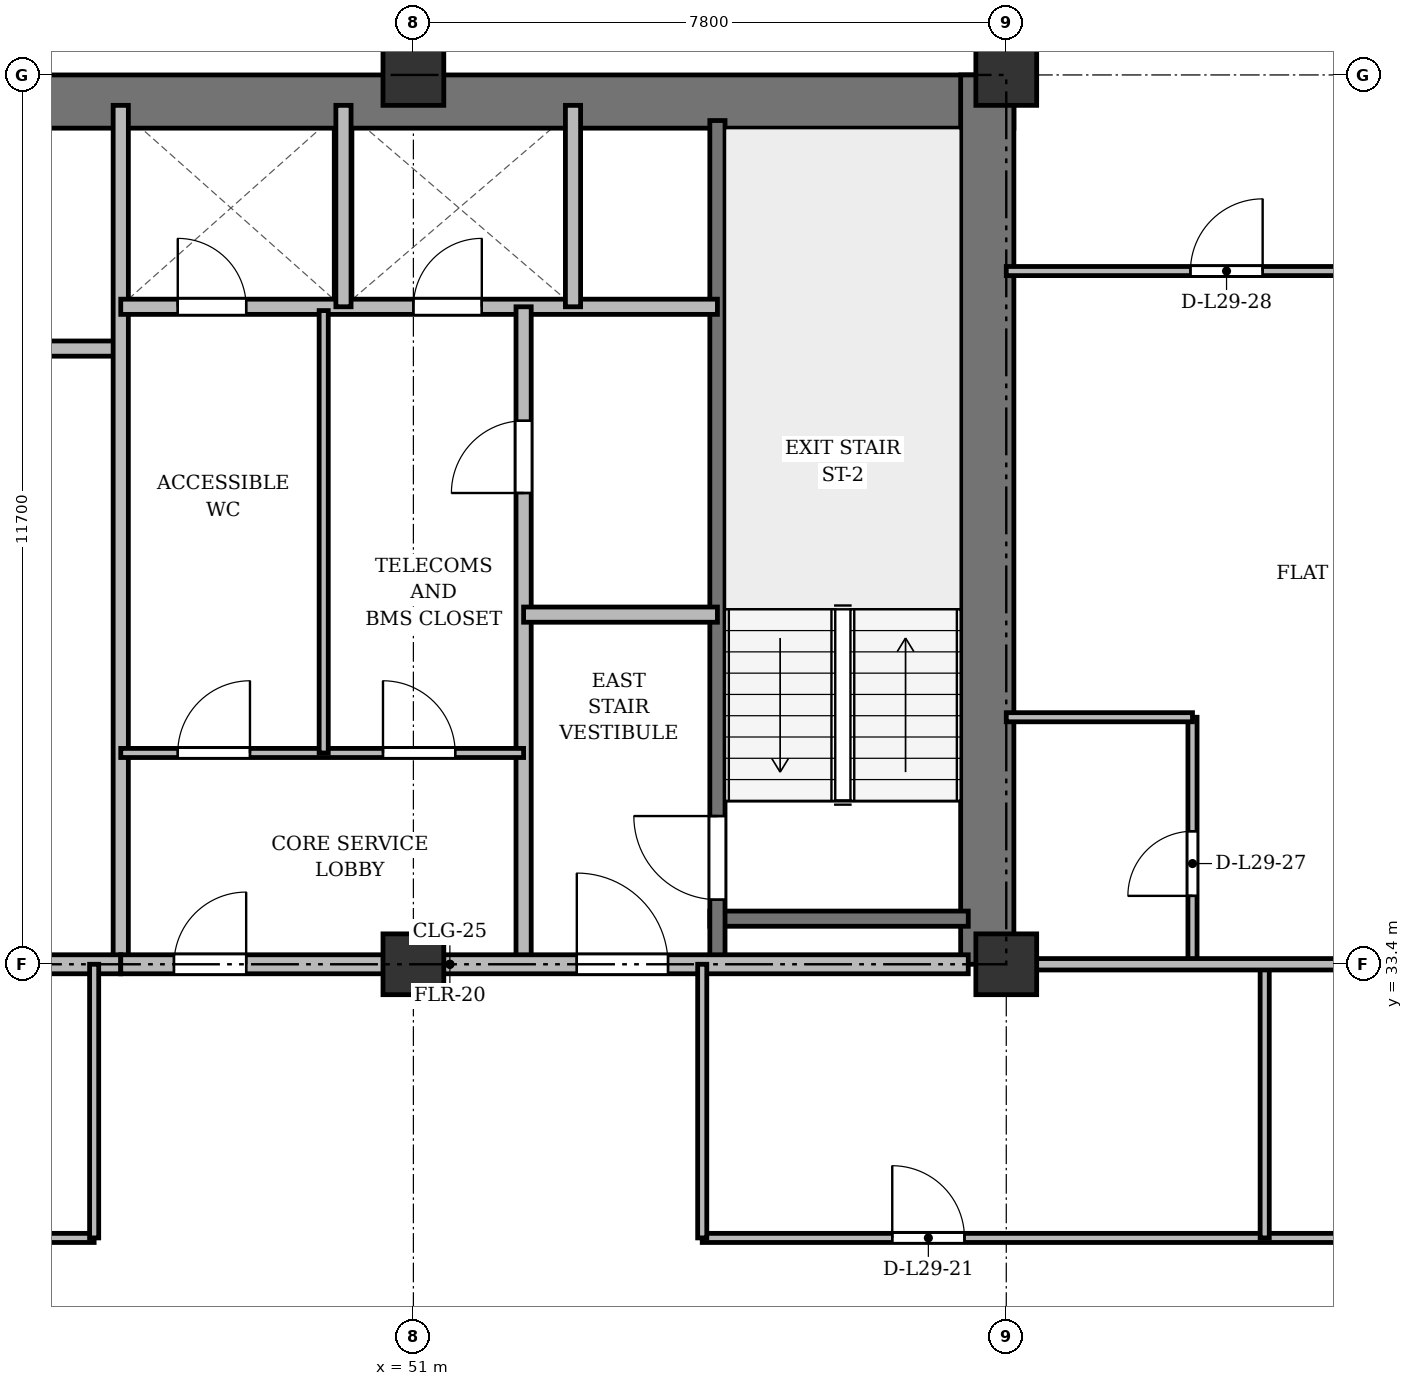
"""IFC4 building model, lengths in metres.
Left out: names, types, materials, properties, quantities, classifications, styles, units other than length and angle.
Written with IfcOpenShell. Run it as: python <this file> out.ifc"""

import sys

from ifc_helpers import new_model, si_unit, direction, frame, frame_2d, origin, origin_2d, place, context, subcontext, project, spatial, rectangle, extrude, source, transform, mapped, element, fill, save


model = new_model("IFC4")
c1 = context("Model", 3, precision=1e-05, world=origin(), true_north=direction((0.0, 1.0)))
c2 = subcontext(c1, "Body", "Model", "MODEL_VIEW")
j1 = project(units=[si_unit("LENGTHUNIT", "METRE"), si_unit("PLANEANGLEUNIT", "RADIAN")], contexts=[c1])
p1 = place(None, origin())
s1 = spatial("IfcSite", under=j1, at=p1, CompositionType="ELEMENT")
p2 = place(p1, origin())
s2 = spatial("IfcBuilding", under=s1, at=p2, CompositionType="ELEMENT")
p3 = place(p2, frame((0.0, 0.0, 114.1)))
s3 = spatial("IfcBuildingStorey", under=s2, at=p3, CompositionType="ELEMENT", Elevation=114.1)
m1 = source(origin(), c2, "Body", "SweptSolid", [
    extrude(rectangle(XDim=0.8, YDim=0.8, at=origin_2d()), origin(), (0.0, 0.0, 1.0), 3.6),
])
for number, where, z_axis, x_axis in (
    (1, (51.0, 33.4, 0.0), (0.0, 0.0, 1.0), (1.0, 0.0, 0.0)),
    (2, (51.0, 45.1, 0.0), (0.0, 0.0, 1.0), (1.0, 0.0, 0.0)),
    (3, (58.8, 33.4, 0.0), (0.0, 0.0, 1.0), (1.0, 0.0, 0.0)),
    (4, (58.8, 45.1, 0.0), (0.0, 0.0, 1.0), (1.0, 0.0, 0.0)),
):
    element("IfcColumn", number, at=place(p3, frame(where, z_axis=z_axis, x_axis=x_axis)), inside=s3, PredefinedType="COLUMN", context=c2, shape_type="MappedRepresentation", body=[
        mapped(m1, transform((0.0, 0.0, 0.0), x_axis=(1.0, 0.0, 0.0), y_axis=(0.0, 1.0, 0.0), z_axis=(0.0, 0.0, 1.0), scale=1.0)),
    ])
p4 = place(p3, frame((15.5, 44.75, 0.0), z_axis=(0.0, 0.0, 1.0), x_axis=(1.0, 0.0, 0.0)))
e5 = element("IfcWall", 5, at=p4, inside=s3, PredefinedType="SHEAR", context=c2, shape_type="SweptSolid", body=[
    extrude(rectangle(XDim=43.4, YDim=0.7, at=frame_2d((21.7, 0.0))), origin(), (0.0, 0.0, 1.0), 3.34),
])
p5 = place(p3, frame((58.55, 33.4, 0.0), z_axis=(0.0, 0.0, 1.0), x_axis=(0.0, 1.0, 0.0)))
e6 = element("IfcWall", 6, at=p5, inside=s3, PredefinedType="SHEAR", context=c2, shape_type="SweptSolid", body=[
    extrude(rectangle(XDim=11.7, YDim=0.7, at=frame_2d((5.85, 0.0))), origin(), (0.0, 0.0, 1.0), 3.34),
])
p6 = place(p3, frame((54.9, 34.0, 0.0), z_axis=(0.0, 0.0, 1.0), x_axis=(1.0, 0.0, 0.0)))
e7 = element("IfcWall", 7, at=p6, inside=s3, PredefinedType="SHEAR", context=c2, shape_type="SweptSolid", body=[
    extrude(rectangle(XDim=3.4, YDim=0.2, at=frame_2d((1.7, 0.0))), origin(), (0.0, 0.0, 1.0), 3.34),
])
p7 = place(p3, frame((55.0, 33.4, 0.0), z_axis=(0.0, 0.0, 1.0), x_axis=(0.0, 1.0, 0.0)))
e8 = element("IfcWall", 8, at=p7, inside=s3, PredefinedType="SHEAR", context=c2, shape_type="SweptSolid", body=[
    extrude(rectangle(XDim=11.1, YDim=0.2, at=frame_2d((5.55, 0.0))), origin(), (0.0, 0.0, 1.0), 3.34),
])
p8 = place(p7, frame((0.85, 0.0, 0.0)))
e9 = element("IfcOpeningElement", 9, at=p8, cuts=e8, PredefinedType="OPENING", context=c2, shape_type="SweptSolid", body=[
    extrude(rectangle(XDim=1.1, YDim=2.15, at=frame_2d((0.55, 1.075))), frame((0.0, 0.11, 0.0), z_axis=(0.0, -1.0, 0.0), x_axis=(1.0, 0.0, 0.0)), (0.0, 0.0, 1.0), 0.22),
])
p9 = place(p3, frame((40.25, 41.5, 0.0), z_axis=(0.0, 0.0, 1.0), x_axis=(1.0, 0.0, 0.0)))
e10 = element("IfcWall", 10, at=p9, inside=s3, PredefinedType="SOLIDWALL", context=c2, shape_type="SweptSolid", body=[
    extrude(rectangle(XDim=6.9, YDim=0.2, at=frame_2d((3.45, 0.0))), origin(), (0.0, 0.0, 1.0), 2.84),
])
p10 = place(p3, frame((47.15, 33.4, 0.0), z_axis=(0.0, 0.0, 1.0), x_axis=(0.0, 1.0, 0.0)))
e11 = element("IfcWall", 11, at=p10, inside=s3, PredefinedType="SOLIDWALL", context=c2, shape_type="SweptSolid", body=[
    extrude(rectangle(XDim=11.3, YDim=0.2, at=frame_2d((5.65, 0.0))), origin(), (0.0, 0.0, 1.0), 2.752),
])
p11 = place(p3, frame((26.3, 33.4, 0.0), z_axis=(0.0, 0.0, 1.0), x_axis=(1.0, 0.0, 0.0)))
e12 = element("IfcWall", 12, at=p11, inside=s3, PredefinedType="PARTITIONING", context=c2, shape_type="SweptSolid", body=[
    extrude(rectangle(XDim=20.85, YDim=0.25, at=frame_2d((10.425, 0.0))), origin(), (0.0, 0.0, 1.0), 2.752),
])
p12 = place(p11, frame((9.2, 0.0, 0.0)))
e13 = element("IfcOpeningElement", 13, at=p12, cuts=e12, PredefinedType="OPENING", context=c2, shape_type="SweptSolid", body=[
    extrude(rectangle(XDim=1.6, YDim=2.2, at=frame_2d((0.8, 1.1))), frame((0.0, 0.135, 0.0), z_axis=(0.0, -1.0, 0.0), x_axis=(1.0, 0.0, 0.0)), (0.0, 0.0, 1.0), 0.27),
])
p13 = place(p3, frame((47.15, 42.05, 0.0), z_axis=(0.0, 0.0, 1.0), x_axis=(1.0, 0.0, 0.0)))
e14 = element("IfcWall", 14, at=p13, inside=s3, PredefinedType="SOLIDWALL", context=c2, shape_type="SweptSolid", body=[
    extrude(rectangle(XDim=7.85, YDim=0.2, at=frame_2d((3.925, 0.0))), origin(), (0.0, 0.0, 1.0), 2.84),
])
p14 = place(p13, frame((0.75, 0.0, 0.0)))
e15 = element("IfcOpeningElement", 15, at=p14, cuts=e14, PredefinedType="OPENING", context=c2, shape_type="SweptSolid", body=[
    extrude(rectangle(XDim=0.9, YDim=2.1, at=frame_2d((0.45, 1.05))), frame((0.0, 0.11, 0.0), z_axis=(0.0, -1.0, 0.0), x_axis=(1.0, 0.0, 0.0)), (0.0, 0.0, 1.0), 0.22),
])
p15 = place(p13, frame((3.85, 0.0, 0.0)))
e16 = element("IfcOpeningElement", 16, at=p15, cuts=e14, PredefinedType="OPENING", context=c2, shape_type="SweptSolid", body=[
    extrude(rectangle(XDim=0.9, YDim=2.1, at=frame_2d((0.45, 1.05))), frame((0.0, 0.11, 0.0), z_axis=(0.0, -1.0, 0.0), x_axis=(1.0, 0.0, 0.0)), (0.0, 0.0, 1.0), 0.22),
])
for number, where, z_axis, x_axis in (
    (17, (50.08, 42.05, 0.0), (0.0, 0.0, 1.0), (0.0, 1.0, 0.0)),
    (18, (53.1, 42.05, 0.0), (0.0, 0.0, 1.0), (0.0, 1.0, 0.0)),
):
    element("IfcWall", number, at=place(p3, frame(where, z_axis=z_axis, x_axis=x_axis)), inside=s3, PredefinedType="SOLIDWALL", context=c2, shape_type="SweptSolid", body=[
        extrude(rectangle(XDim=2.65, YDim=0.2, at=frame_2d((1.325, 0.0))), origin(), (0.0, 0.0, 1.0), 3.34),
    ])
p16 = place(p3, frame((52.45, 33.4, 0.0), z_axis=(0.0, 0.0, 1.0), x_axis=(0.0, 1.0, 0.0)))
e19 = element("IfcWall", 19, at=p16, inside=s3, PredefinedType="PARTITIONING", context=c2, shape_type="SweptSolid", body=[
    extrude(rectangle(XDim=8.65, YDim=0.2, at=frame_2d((4.325, 0.0))), origin(), (0.0, 0.0, 1.0), 2.752),
])
p17 = place(p16, frame((6.2, 0.0, 0.0)))
e20 = element("IfcOpeningElement", 20, at=p17, cuts=e19, PredefinedType="OPENING", context=c2, shape_type="SweptSolid", body=[
    extrude(rectangle(XDim=0.95, YDim=2.15, at=frame_2d((0.475, 1.075))), frame((0.0, 0.11, 0.0), z_axis=(0.0, -1.0, 0.0), x_axis=(1.0, 0.0, 0.0)), (0.0, 0.0, 1.0), 0.22),
])
p18 = place(p3, frame((52.45, 38.0, 0.0), z_axis=(0.0, 0.0, 1.0), x_axis=(1.0, 0.0, 0.0)))
e21 = element("IfcWall", 21, at=p18, inside=s3, PredefinedType="PARTITIONING", context=c2, shape_type="SweptSolid", body=[
    extrude(rectangle(XDim=2.55, YDim=0.2, at=frame_2d((1.275, 0.0))), origin(), (0.0, 0.0, 1.0), 3.34),
])
p19 = place(p3, frame((47.15, 36.18, 0.0), z_axis=(0.0, 0.0, 1.0), x_axis=(1.0, 0.0, 0.0)))
e22 = element("IfcWall", 22, at=p19, inside=s3, PredefinedType="PARTITIONING", context=c2, shape_type="SweptSolid", body=[
    extrude(rectangle(XDim=5.3, YDim=0.12, at=frame_2d((2.65, 0.0))), origin(), (0.0, 0.0, 1.0), 2.84),
])
p20 = place(p19, frame((0.75, 0.0, 0.0)))
e23 = element("IfcOpeningElement", 23, at=p20, cuts=e22, PredefinedType="OPENING", context=c2, shape_type="SweptSolid", body=[
    extrude(rectangle(XDim=0.95, YDim=2.15, at=frame_2d((0.475, 1.075))), frame((0.0, 0.07, 0.0), z_axis=(0.0, -1.0, 0.0), x_axis=(1.0, 0.0, 0.0)), (0.0, 0.0, 1.0), 0.14),
])
p21 = place(p19, frame((3.45, 0.0, 0.0)))
e24 = element("IfcOpeningElement", 24, at=p21, cuts=e22, PredefinedType="OPENING", context=c2, shape_type="SweptSolid", body=[
    extrude(rectangle(XDim=0.95, YDim=2.15, at=frame_2d((0.475, 1.075))), frame((0.0, 0.07, 0.0), z_axis=(0.0, -1.0, 0.0), x_axis=(1.0, 0.0, 0.0)), (0.0, 0.0, 1.0), 0.14),
])
p22 = place(p3, frame((49.82, 36.18, 0.0), z_axis=(0.0, 0.0, 1.0), x_axis=(0.0, 1.0, 0.0)))
e25 = element("IfcWall", 25, at=p22, inside=s3, PredefinedType="PARTITIONING", context=c2, shape_type="SweptSolid", body=[
    extrude(rectangle(XDim=5.82, YDim=0.12, at=frame_2d((2.91, 0.0))), origin(), (0.0, 0.0, 1.0), 3.34),
])
p23 = place(p3, frame((47.15, 33.4, 0.0), z_axis=(0.0, 0.0, 1.0), x_axis=(1.0, 0.0, 0.0)))
e26 = element("IfcWall", 26, at=p23, inside=s3, PredefinedType="PARTITIONING", context=c2, shape_type="SweptSolid", body=[
    extrude(rectangle(XDim=11.15, YDim=0.25, at=frame_2d((5.575, 0.0))), origin(), (0.0, 0.0, 1.0), 2.752),
])
p24 = place(p23, frame((0.7, 0.0, 0.0)))
e27 = element("IfcOpeningElement", 27, at=p24, cuts=e26, PredefinedType="OPENING", context=c2, shape_type="SweptSolid", body=[
    extrude(rectangle(XDim=0.95, YDim=2.15, at=frame_2d((0.475, 1.075))), frame((0.0, 0.135, 0.0), z_axis=(0.0, -1.0, 0.0), x_axis=(1.0, 0.0, 0.0)), (0.0, 0.0, 1.0), 0.27),
])
p25 = place(p23, frame((6.0, 0.0, 0.0)))
e28 = element("IfcOpeningElement", 28, at=p25, cuts=e26, PredefinedType="OPENING", context=c2, shape_type="SweptSolid", body=[
    extrude(rectangle(XDim=1.2, YDim=2.15, at=frame_2d((0.6, 1.075))), frame((0.0, 0.135, 0.0), z_axis=(0.0, -1.0, 0.0), x_axis=(1.0, 0.0, 0.0)), (0.0, 0.0, 1.0), 0.27),
])
p26 = place(p3, frame((38.2, 29.8, 0.0), z_axis=(0.0, 0.0, 1.0), x_axis=(1.0, 0.0, 0.0)))
e29 = element("IfcWall", 29, at=p26, inside=s3, PredefinedType="PARTITIONING", context=c2, shape_type="SweptSolid", body=[
    extrude(rectangle(XDim=8.6, YDim=0.12, at=frame_2d((4.3, 0.0))), origin(), (0.0, 0.0, 1.0), 2.84),
])
p27 = place(p26, frame((3.462, 0.0, 0.0)))
e30 = element("IfcOpeningElement", 30, at=p27, cuts=e29, PredefinedType="OPENING", context=c2, shape_type="SweptSolid", body=[
    extrude(rectangle(XDim=0.95, YDim=2.15, at=frame_2d((0.475, 1.075))), frame((0.0, 0.07, 0.0), z_axis=(0.0, -1.0, 0.0), x_axis=(1.0, 0.0, 0.0)), (0.0, 0.0, 1.0), 0.14),
])
p28 = place(p3, frame((54.8, 29.8, 0.0), z_axis=(0.0, 0.0, 1.0), x_axis=(1.0, 0.0, 0.0)))
e31 = element("IfcWall", 31, at=p28, inside=s3, PredefinedType="PARTITIONING", context=c2, shape_type="SweptSolid", body=[
    extrude(rectangle(XDim=14.85, YDim=0.12, at=frame_2d((7.425, 0.0))), origin(), (0.0, 0.0, 1.0), 2.84),
])
p29 = place(p28, frame((2.5, 0.0, 0.0)))
e32 = element("IfcOpeningElement", 32, at=p29, cuts=e31, PredefinedType="OPENING", context=c2, shape_type="SweptSolid", body=[
    extrude(rectangle(XDim=0.95, YDim=2.15, at=frame_2d((0.475, 1.075))), frame((0.0, 0.07, 0.0), z_axis=(0.0, -1.0, 0.0), x_axis=(1.0, 0.0, 0.0)), (0.0, 0.0, 1.0), 0.14),
])
p30 = place(p28, frame((9.2, 0.0, 0.0)))
e33 = element("IfcOpeningElement", 33, at=p30, cuts=e31, PredefinedType="OPENING", context=c2, shape_type="SweptSolid", body=[
    extrude(rectangle(XDim=0.95, YDim=2.15, at=frame_2d((0.475, 1.075))), frame((0.0, 0.07, 0.0), z_axis=(0.0, -1.0, 0.0), x_axis=(1.0, 0.0, 0.0)), (0.0, 0.0, 1.0), 0.14),
])
for number, where, z_axis, x_axis in (
    (34, (62.2, 29.8, 0.0), (0.0, 0.0, 1.0), (0.0, 1.0, 0.0)),
    (35, (46.8, 29.8, 0.0), (0.0, 0.0, 1.0), (0.0, 1.0, 0.0)),
    (36, (54.8, 29.8, 0.0), (0.0, 0.0, 1.0), (0.0, 1.0, 0.0)),
):
    element("IfcWall", number, at=place(p3, frame(where, z_axis=z_axis, x_axis=x_axis)), inside=s3, PredefinedType="PARTITIONING", context=c2, shape_type="SweptSolid", body=[
        extrude(rectangle(XDim=3.6, YDim=0.12, at=frame_2d((1.8, 0.0))), origin(), (0.0, 0.0, 1.0), 2.752),
    ])
p31 = place(p3, frame((61.25, 33.4, 0.0), z_axis=(0.0, 0.0, 1.0), x_axis=(0.0, 1.0, 0.0)))
e37 = element("IfcWall", 37, at=p31, inside=s3, PredefinedType="PARTITIONING", context=c2, shape_type="SweptSolid", body=[
    extrude(rectangle(XDim=3.25, YDim=0.12, at=frame_2d((1.625, 0.0))), origin(), (0.0, 0.0, 1.0), 2.752),
])
p32 = place(p31, frame((0.9, 0.0, 0.0)))
e38 = element("IfcOpeningElement", 38, at=p32, cuts=e37, PredefinedType="OPENING", context=c2, shape_type="SweptSolid", body=[
    extrude(rectangle(XDim=0.85, YDim=2.1, at=frame_2d((0.425, 1.05))), frame((0.0, 0.07, 0.0), z_axis=(0.0, -1.0, 0.0), x_axis=(1.0, 0.0, 0.0)), (0.0, 0.0, 1.0), 0.14),
])
p33 = place(p3, frame((58.8, 36.65, 0.0), z_axis=(0.0, 0.0, 1.0), x_axis=(1.0, 0.0, 0.0)))
e39 = element("IfcWall", 39, at=p33, inside=s3, PredefinedType="PARTITIONING", context=c2, shape_type="SweptSolid", body=[
    extrude(rectangle(XDim=2.45, YDim=0.12, at=frame_2d((1.225, 0.0))), origin(), (0.0, 0.0, 1.0), 2.84),
])
p34 = place(p3, frame((58.8, 42.52, 0.0), z_axis=(0.0, 0.0, 1.0), x_axis=(1.0, 0.0, 0.0)))
e40 = element("IfcWall", 40, at=p34, inside=s3, PredefinedType="PARTITIONING", context=c2, shape_type="SweptSolid", body=[
    extrude(rectangle(XDim=5.425, YDim=0.12, at=frame_2d((2.712, 0.0))), origin(), (0.0, 0.0, 1.0), 2.84),
])
p35 = place(p34, frame((2.423, 0.0, 0.0)))
e41 = element("IfcOpeningElement", 41, at=p35, cuts=e40, PredefinedType="OPENING", context=c2, shape_type="SweptSolid", body=[
    extrude(rectangle(XDim=0.95, YDim=2.15, at=frame_2d((0.475, 1.075))), frame((0.0, 0.07, 0.0), z_axis=(0.0, -1.0, 0.0), x_axis=(1.0, 0.0, 0.0)), (0.0, 0.0, 1.0), 0.14),
])
p36 = place(p3, frame((58.8, 33.4, 0.0), z_axis=(0.0, 0.0, 1.0), x_axis=(1.0, 0.0, 0.0)))
e42 = element("IfcWall", 42, at=p36, inside=s3, PredefinedType="PARTITIONING", context=c2, shape_type="SweptSolid", body=[
    extrude(rectangle(XDim=10.85, YDim=0.15, at=frame_2d((5.425, 0.0))), origin(), (0.0, 0.0, 1.0), 2.752),
])
p37 = place(p36, frame((4.933, 0.0, 0.0)))
e43 = element("IfcOpeningElement", 43, at=p37, cuts=e42, PredefinedType="OPENING", context=c2, shape_type="SweptSolid", body=[
    extrude(rectangle(XDim=0.95, YDim=2.15, at=frame_2d((0.475, 1.075))), frame((0.0, 0.085, 0.0), z_axis=(0.0, -1.0, 0.0), x_axis=(1.0, 0.0, 0.0)), (0.0, 0.0, 1.0), 0.17),
])
p38 = place(p3, frame((58.8, 44.75, 0.0), z_axis=(0.0, 0.0, 1.0), x_axis=(0.0, 1.0, 0.0)))
e44 = element("IfcWall", 44, at=p38, inside=s3, PredefinedType="PARTITIONING", context=c2, shape_type="SweptSolid", body=[
    extrude(rectangle(XDim=3.61, YDim=0.15, at=frame_2d((1.805, 0.0))), origin(), (0.0, 0.0, 1.0), 2.84),
])
p39 = place(p38, frame((1.1, 0.0, 0.0)))
e45 = element("IfcOpeningElement", 45, at=p39, cuts=e44, PredefinedType="OPENING", context=c2, shape_type="SweptSolid", body=[
    extrude(rectangle(XDim=0.95, YDim=2.15, at=frame_2d((0.475, 1.075))), frame((0.0, 0.085, 0.0), z_axis=(0.0, -1.0, 0.0), x_axis=(1.0, 0.0, 0.0)), (0.0, 0.0, 1.0), 0.17),
])
m2 = source(origin(), c2, "Body", "SweptSolid", [
    extrude(rectangle(XDim=1.1, YDim=2.15, at=frame_2d((0.55, 1.075))), frame((0.0, 0.025, 0.0), z_axis=(0.0, -1.0, 0.0), x_axis=(1.0, 0.0, 0.0)), (0.0, 0.0, 1.0), 0.05),
])
p40 = place(p8, origin())
e46 = element("IfcDoor", 46, at=p40, inside=s3, OperationType="SINGLE_SWING_RIGHT", PredefinedType="DOOR", context=c2, shape_type="MappedRepresentation", body=[
    mapped(m2, transform((0.0, 0.0, 0.0), x_axis=(1.0, 0.0, 0.0), y_axis=(0.0, 1.0, 0.0), z_axis=(0.0, 0.0, 1.0), scale=1.0)),
])
fill(e9, e46)
m3 = source(origin(), c2, "Body", "SweptSolid", [
    extrude(rectangle(XDim=0.9, YDim=2.1, at=frame_2d((0.45, 1.05))), frame((0.0, 0.025, 0.0), z_axis=(0.0, -1.0, 0.0), x_axis=(1.0, 0.0, 0.0)), (0.0, 0.0, 1.0), 0.05),
])
p41 = place(p14, origin())
e47 = element("IfcDoor", 47, at=p41, inside=s3, OperationType="SINGLE_SWING_LEFT", PredefinedType="DOOR", context=c2, shape_type="MappedRepresentation", body=[
    mapped(m3, transform((0.0, 0.0, 0.0), x_axis=(1.0, 0.0, 0.0), y_axis=(0.0, 1.0, 0.0), z_axis=(0.0, 0.0, 1.0), scale=1.0)),
])
fill(e15, e47)
p42 = place(p15, origin())
e48 = element("IfcDoor", 48, at=p42, inside=s3, OperationType="SINGLE_SWING_RIGHT", PredefinedType="DOOR", context=c2, shape_type="MappedRepresentation", body=[
    mapped(m3, transform((0.0, 0.0, 0.0), x_axis=(1.0, 0.0, 0.0), y_axis=(0.0, 1.0, 0.0), z_axis=(0.0, 0.0, 1.0), scale=1.0)),
])
fill(e16, e48)
m4 = source(origin(), c2, "Body", "SweptSolid", [
    extrude(rectangle(XDim=0.95, YDim=2.15, at=frame_2d((0.475, 1.075))), frame((0.0, 0.025, 0.0), z_axis=(0.0, -1.0, 0.0), x_axis=(1.0, 0.0, 0.0)), (0.0, 0.0, 1.0), 0.05),
])
p43 = place(p17, origin())
e49 = element("IfcDoor", 49, at=p43, inside=s3, OperationType="SINGLE_SWING_LEFT", PredefinedType="DOOR", context=c2, shape_type="MappedRepresentation", body=[
    mapped(m4, transform((0.0, 0.0, 0.0), x_axis=(1.0, 0.0, 0.0), y_axis=(0.0, 1.0, 0.0), z_axis=(0.0, 0.0, 1.0), scale=1.0)),
])
fill(e20, e49)
p44 = place(p20, origin())
e50 = element("IfcDoor", 50, at=p44, inside=s3, OperationType="SINGLE_SWING_RIGHT", PredefinedType="DOOR", context=c2, shape_type="MappedRepresentation", body=[
    mapped(m4, transform((0.0, 0.0, 0.0), x_axis=(1.0, 0.0, 0.0), y_axis=(0.0, 1.0, 0.0), z_axis=(0.0, 0.0, 1.0), scale=1.0)),
])
fill(e23, e50)
p45 = place(p21, origin())
e51 = element("IfcDoor", 51, at=p45, inside=s3, OperationType="SINGLE_SWING_LEFT", PredefinedType="DOOR", context=c2, shape_type="MappedRepresentation", body=[
    mapped(m4, transform((0.0, 0.0, 0.0), x_axis=(1.0, 0.0, 0.0), y_axis=(0.0, 1.0, 0.0), z_axis=(0.0, 0.0, 1.0), scale=1.0)),
])
fill(e24, e51)
p46 = place(p24, origin())
e52 = element("IfcDoor", 52, at=p46, inside=s3, OperationType="SINGLE_SWING_RIGHT", PredefinedType="DOOR", context=c2, shape_type="MappedRepresentation", body=[
    mapped(m4, transform((0.0, 0.0, 0.0), x_axis=(1.0, 0.0, 0.0), y_axis=(0.0, 1.0, 0.0), z_axis=(0.0, 0.0, 1.0), scale=1.0)),
])
fill(e27, e52)
m5 = source(origin(), c2, "Body", "SweptSolid", [
    extrude(rectangle(XDim=1.2, YDim=2.15, at=frame_2d((0.6, 1.075))), frame((0.0, 0.025, 0.0), z_axis=(0.0, -1.0, 0.0), x_axis=(1.0, 0.0, 0.0)), (0.0, 0.0, 1.0), 0.05),
])
p47 = place(p25, origin())
e53 = element("IfcDoor", 53, at=p47, inside=s3, OperationType="SINGLE_SWING_LEFT", PredefinedType="DOOR", context=c2, shape_type="MappedRepresentation", body=[
    mapped(m5, transform((0.0, 0.0, 0.0), x_axis=(1.0, 0.0, 0.0), y_axis=(0.0, 1.0, 0.0), z_axis=(0.0, 0.0, 1.0), scale=1.0)),
])
fill(e28, e53)
p48 = place(p29, origin())
e54 = element("IfcDoor", 54, at=p48, inside=s3, OperationType="SINGLE_SWING_LEFT", PredefinedType="DOOR", context=c2, shape_type="MappedRepresentation", body=[
    mapped(m4, transform((0.0, 0.0, 0.0), x_axis=(1.0, 0.0, 0.0), y_axis=(0.0, 1.0, 0.0), z_axis=(0.0, 0.0, 1.0), scale=1.0)),
])
fill(e32, e54)
m6 = source(origin(), c2, "Body", "SweptSolid", [
    extrude(rectangle(XDim=0.85, YDim=2.1, at=frame_2d((0.425, 1.05))), frame((0.0, 0.025, 0.0), z_axis=(0.0, -1.0, 0.0), x_axis=(1.0, 0.0, 0.0)), (0.0, 0.0, 1.0), 0.05),
])
p49 = place(p32, origin())
e55 = element("IfcDoor", 55, at=p49, inside=s3, OperationType="SINGLE_SWING_LEFT", PredefinedType="DOOR", context=c2, shape_type="MappedRepresentation", body=[
    mapped(m6, transform((0.0, 0.0, 0.0), x_axis=(1.0, 0.0, 0.0), y_axis=(0.0, 1.0, 0.0), z_axis=(0.0, 0.0, 1.0), scale=1.0)),
])
fill(e38, e55)
p50 = place(p35, origin())
e56 = element("IfcDoor", 56, at=p50, inside=s3, OperationType="SINGLE_SWING_RIGHT", PredefinedType="DOOR", context=c2, shape_type="MappedRepresentation", body=[
    mapped(m4, transform((0.0, 0.0, 0.0), x_axis=(1.0, 0.0, 0.0), y_axis=(0.0, 1.0, 0.0), z_axis=(0.0, 0.0, 1.0), scale=1.0)),
])
fill(e41, e56)
save(model, sys.argv[1])
